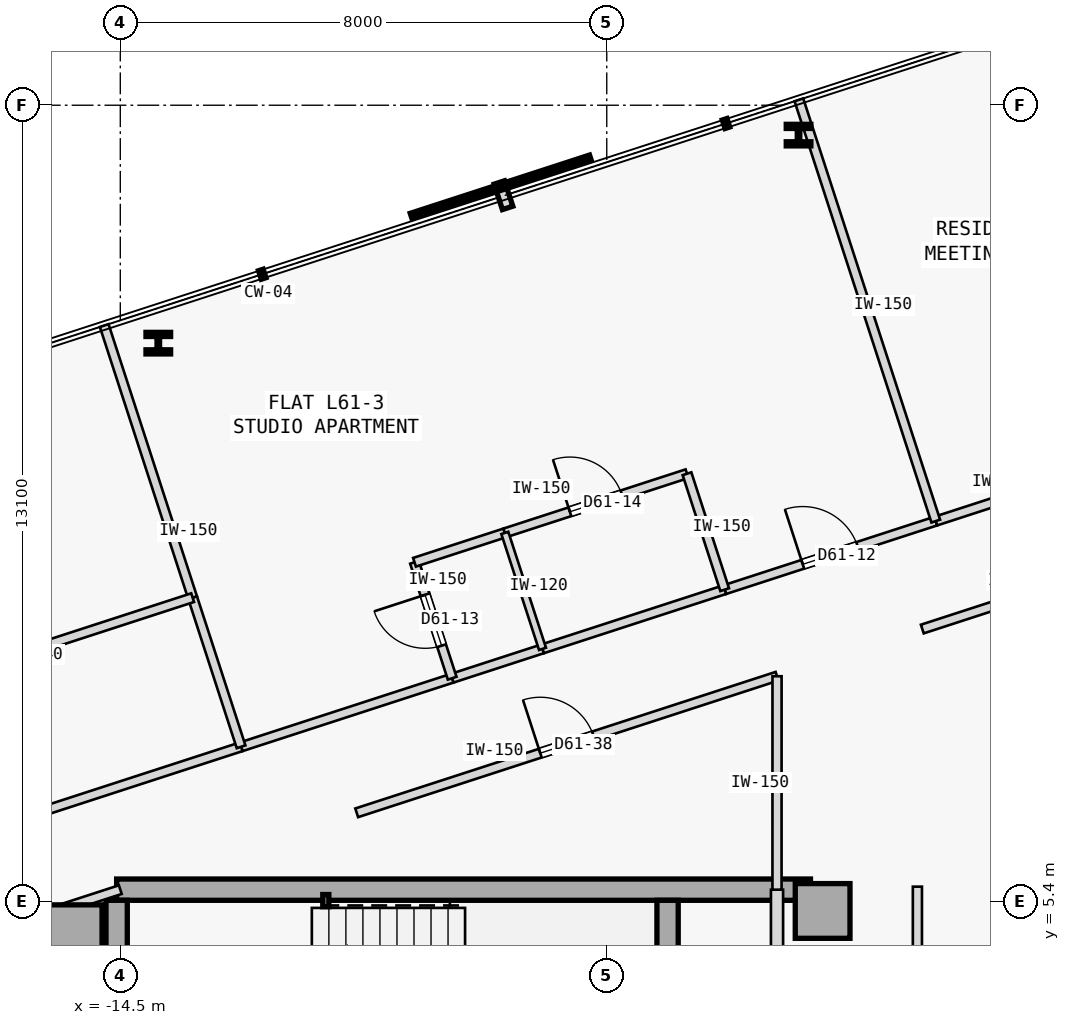
"""IFC4 building model, lengths in metres.
Left out: names, types, materials, properties, quantities, classifications, styles, units other than length and angle.
Written with IfcOpenShell. Run it as: python <this file> out.ifc"""

import sys

from ifc_helpers import new_model, si_unit, direction, frame, frame_2d, origin, origin_2d, place, context, subcontext, project, spatial, rectangle, hollow_rectangle, i_section, extrude, element, fill, save


model = new_model("IFC4")
c1 = context("Model", 3, precision=1e-05, world=origin(), true_north=direction((0.0, 1.0)))
c2 = subcontext(c1, "Body", "Model", "MODEL_VIEW")
j1 = project(units=[si_unit("LENGTHUNIT", "METRE"), si_unit("PLANEANGLEUNIT", "RADIAN")], contexts=[c1])
p1 = place(None, origin())
s1 = spatial("IfcSite", under=j1, at=p1, CompositionType="ELEMENT")
p2 = place(p1, origin())
s2 = spatial("IfcBuilding", under=s1, at=p2, CompositionType="ELEMENT")
p3 = place(p2, frame((0.0, 0.0, 231.0)))
s3 = spatial("IfcBuildingStorey", under=s2, at=p3, CompositionType="ELEMENT", Elevation=231.0)
for number, where, z_axis, x_axis in (
    (1, (-15.25, 4.9, 0.0), (0.0, 0.0, 1.0), (1.0, 0.0, 0.0)),
    (2, (-2.95, 5.25, 0.0), (0.0, 0.0, 1.0), (1.0, 0.0, 0.0)),
):
    element("IfcColumn", number, at=place(p3, frame(where, z_axis=z_axis, x_axis=x_axis)), inside=s3, PredefinedType="COLUMN", context=c2, shape_type="SweptSolid", body=[
        extrude(rectangle(XDim=0.9, YDim=0.9, at=origin_2d()), origin(), (0.0, 0.0, 1.0), 3.35),
    ])
p4 = place(p3, frame((-14.56, 5.6, 0.0), z_axis=(0.0, 0.0, 1.0), x_axis=(1.0, 0.0, 0.0)))
e3 = element("IfcWall", 3, at=p4, inside=s3, PredefinedType="SHEAR", context=c2, shape_type="SweptSolid", body=[
    extrude(rectangle(XDim=11.41, YDim=0.35, at=frame_2d((5.705, 0.0))), origin(), (0.0, 0.0, 1.0), 3.125),
])
p5 = place(p3, frame((-14.56, -5.425, 0.0), z_axis=(0.0, 0.0, 1.0), x_axis=(0.0, 1.0, 0.0)))
e4 = element("IfcWall", 4, at=p5, inside=s3, PredefinedType="SHEAR", context=c2, shape_type="SweptSolid", body=[
    extrude(rectangle(XDim=10.85, YDim=0.35, at=frame_2d((5.425, 0.0))), origin(), (0.0, 0.0, 1.0), 3.125),
])
p6 = place(p3, frame((-5.5, 2.15, 0.0), z_axis=(0.0, 0.0, 1.0), x_axis=(0.0, 1.0, 0.0)))
e5 = element("IfcWall", 5, at=p6, inside=s3, PredefinedType="SHEAR", context=c2, shape_type="SweptSolid", body=[
    extrude(rectangle(XDim=3.275, YDim=0.35, at=frame_2d((1.638, 0.0))), origin(), (0.0, 0.0, 1.0), 3.125),
])
p7 = place(p3, frame((-11.12, 5.42, 0.0), z_axis=(0.0, 0.0, 1.0), x_axis=(1.0, 0.0, 0.0)))
e6 = element("IfcColumn", 6, at=p7, inside=s3, PredefinedType="COLUMN", context=c2, shape_type="SweptSolid", body=[
    extrude(hollow_rectangle(XDim=0.1, YDim=0.2, WallThickness=0.008, at=origin_2d()), origin(), (0.0, 0.0, 1.0), 3.35),
])
for number, where, z_axis, x_axis in (
    (7, (-3.346, 18.009, 0.0), (0.0, 0.0, 1.0), (1.0, 0.0, 0.0)),
    (8, (-13.875, 14.587, 0.0), (0.0, 0.0, 1.0), (1.0, 0.0, 0.0)),
):
    element("IfcColumn", number, at=place(p3, frame(where, z_axis=z_axis, x_axis=x_axis)), inside=s3, PredefinedType="COLUMN", context=c2, shape_type="SweptSolid", body=[
        extrude(i_section(OverallWidth=0.405, OverallDepth=0.355, WebThickness=0.042, FlangeThickness=0.068, FilletRadius=0.015, at=origin_2d()), origin(), (0.0, 0.0, 1.0), 3.35),
    ])
p8 = place(p3, frame((-3.7, -1.15, 0.0), z_axis=(0.0, 0.0, 1.0), x_axis=(0.0, 1.0, 0.0)))
e9 = element("IfcWall", 9, at=p8, inside=s3, PredefinedType="STANDARD", context=c2, shape_type="SweptSolid", body=[
    extrude(rectangle(XDim=6.75, YDim=0.2, at=frame_2d((3.375, 0.0))), origin(), (0.0, 0.0, 1.0), 3.125),
])
p9 = place(p8, frame((3.6, 0.0, 0.0)))
e10 = element("IfcOpeningElement", 10, at=p9, cuts=e9, PredefinedType="OPENING", context=c2, shape_type="SweptSolid", body=[
    extrude(rectangle(XDim=0.92, YDim=2.15, at=frame_2d((0.46, 1.075))), frame((0.0, 0.11, 0.0), z_axis=(0.0, -1.0, 0.0), x_axis=(1.0, 0.0, 0.0)), (0.0, 0.0, 1.0), 0.22),
])
p10 = place(p8, frame((0.85, 0.0, 0.0)))
e11 = element("IfcOpeningElement", 11, at=p10, cuts=e9, PredefinedType="OPENING", context=c2, shape_type="SweptSolid", body=[
    extrude(rectangle(XDim=0.9, YDim=2.15, at=frame_2d((0.45, 1.075))), frame((0.0, 0.11, 0.0), z_axis=(0.0, -1.0, 0.0), x_axis=(1.0, 0.0, 0.0)), (0.0, 0.0, 1.0), 0.22),
])
p11 = place(p3, frame((-1.391, -5.65, 0.0), z_axis=(0.0, 0.0, 1.0), x_axis=(-8.6422954e-05, 0.999999996266, 0.0)))
e12 = element("IfcWall", 12, at=p11, inside=s3, PredefinedType="PARTITIONING", context=c2, shape_type="SweptSolid", body=[
    extrude(rectangle(XDim=11.3, YDim=0.15, at=frame_2d((5.65, 0.0))), origin(), (0.0, 0.0, 1.0), 3.125),
])
p12 = place(p11, frame((5.175, 0.0, 0.0)))
e13 = element("IfcOpeningElement", 13, at=p12, cuts=e12, PredefinedType="OPENING", context=c2, shape_type="SweptSolid", body=[
    extrude(rectangle(XDim=0.95, YDim=2.15, at=frame_2d((0.475, 1.075))), frame((0.0, 0.085, 0.0), z_axis=(0.0, -1.0, 0.0), x_axis=(1.0, 0.0, 0.0)), (0.0, 0.0, 1.0), 0.17),
])
p13 = place(p3, frame((-12.513, 7.949, 0.0), z_axis=(0.0, 0.0, 1.0), x_axis=(0.951050780541, 0.309034646652, 0.0)))
e14 = element("IfcWall", 14, at=p13, inside=s3, PredefinedType="PARTITIONING", context=c2, shape_type="SweptSolid", body=[
    extrude(rectangle(XDim=3.65, YDim=0.15, at=frame_2d((1.825, 0.0))), origin(), (0.0, 0.0, 1.0), 3.125),
])
p14 = place(p3, frame((-4.561, 10.533, 0.0), z_axis=(0.0, 0.0, 1.0), x_axis=(0.951057168147, 0.309014988174, 0.0)))
e15 = element("IfcWall", 15, at=p14, inside=s3, PredefinedType="PARTITIONING", context=c2, shape_type="SweptSolid", body=[
    extrude(rectangle(XDim=3.65, YDim=0.15, at=frame_2d((1.825, 0.0))), origin(), (0.0, 0.0, 1.0), 3.125),
])
p15 = place(p14, frame((1.35, 0.0, 0.0)))
e16 = element("IfcOpeningElement", 16, at=p15, cuts=e15, PredefinedType="OPENING", context=c2, shape_type="SweptSolid", body=[
    extrude(rectangle(XDim=0.95, YDim=2.15, at=frame_2d((0.475, 1.075))), frame((0.0, 0.085, 0.0), z_axis=(0.0, -1.0, 0.0), x_axis=(1.0, 0.0, 0.0)), (0.0, 0.0, 1.0), 0.17),
])
p16 = place(p3, frame((-9.042, 9.077, 0.0), z_axis=(0.0, 0.0, 1.0), x_axis=(0.951062779317, 0.308997718112, 0.0)))
e17 = element("IfcWall", 17, at=p16, inside=s3, PredefinedType="PARTITIONING", context=c2, shape_type="SweptSolid", body=[
    extrude(rectangle(XDim=1.562, YDim=0.15, at=frame_2d((0.781, 0.0))), origin(), (0.0, 0.0, 1.0), 3.125),
])
p17 = place(p3, frame((-7.557, 9.56, 0.0), z_axis=(0.0, 0.0, 1.0), x_axis=(0.951058557014, 0.309010713619, 0.0)))
e18 = element("IfcWall", 18, at=p17, inside=s3, PredefinedType="PARTITIONING", context=c2, shape_type="SweptSolid", body=[
    extrude(rectangle(XDim=3.15, YDim=0.15, at=frame_2d((1.575, 0.0))), origin(), (0.0, 0.0, 1.0), 3.125),
])
p18 = place(p3, frame((-17.792, 4.531, 0.0), z_axis=(0.0, 0.0, 1.0), x_axis=(0.951047546178, 0.309044600193, 0.0)))
e19 = element("IfcWall", 19, at=p18, inside=s3, PredefinedType="PARTITIONING", context=c2, shape_type="SweptSolid", body=[
    extrude(rectangle(XDim=3.461, YDim=0.15, at=frame_2d((1.73, 0.0))), origin(), (0.0, 0.0, 1.0), 3.125),
])
p19 = place(p18, frame((0.302, 0.0, 0.0)))
e20 = element("IfcOpeningElement", 20, at=p19, cuts=e19, PredefinedType="OPENING", context=c2, shape_type="SweptSolid", body=[
    extrude(rectangle(XDim=0.92, YDim=2.15, at=frame_2d((0.46, 1.075))), frame((0.0, 0.085, 0.0), z_axis=(0.0, -1.0, 0.0), x_axis=(1.0, 0.0, 0.0)), (0.0, 0.0, 1.0), 0.17),
])
p20 = place(p3, frame((-1.311, 9.886, 0.0), z_axis=(0.0, 0.0, 1.0), x_axis=(0.951068803905, 0.308979174442, 0.0)))
e21 = element("IfcWall", 21, at=p20, inside=s3, PredefinedType="PARTITIONING", context=c2, shape_type="SweptSolid", body=[
    extrude(rectangle(XDim=3.46, YDim=0.15, at=frame_2d((1.73, 0.0))), origin(), (0.0, 0.0, 1.0), 3.125),
])
p21 = place(p3, frame((-10.612, 6.864, 0.0), z_axis=(0.0, 0.0, 1.0), x_axis=(0.951060972078, 0.309003280548, 0.0)))
e22 = element("IfcWall", 22, at=p21, inside=s3, PredefinedType="PARTITIONING", context=c2, shape_type="SweptSolid", body=[
    extrude(rectangle(XDim=7.268, YDim=0.15, at=frame_2d((3.634, 0.0))), origin(), (0.0, 0.0, 1.0), 3.125),
])
p22 = place(p21, frame((3.174, 0.0, 0.0)))
e23 = element("IfcOpeningElement", 23, at=p22, cuts=e22, PredefinedType="OPENING", context=c2, shape_type="SweptSolid", body=[
    extrude(rectangle(XDim=0.92, YDim=2.15, at=frame_2d((0.46, 1.075))), frame((0.0, 0.085, 0.0), z_axis=(0.0, -1.0, 0.0), x_axis=(1.0, 0.0, 0.0)), (0.0, 0.0, 1.0), 0.17),
])
p23 = place(p3, frame((-3.7, 5.6, 0.0), z_axis=(0.0, 0.0, 1.0), x_axis=(0.000139120755, 0.999999990323, 0.0)))
e24 = element("IfcWall", 24, at=p23, inside=s3, PredefinedType="PARTITIONING", context=c2, shape_type="SweptSolid", body=[
    extrude(rectangle(XDim=3.51, YDim=0.15, at=frame_2d((1.755, 0.0))), origin(), (0.0, 0.0, 1.0), 3.125),
])
p24 = place(p3, frame((-18.292, 6.072, 0.0), z_axis=(0.0, 0.0, 1.0), x_axis=(0.951062707515, 0.30899793911, 0.0)))
e25 = element("IfcWall", 25, at=p24, inside=s3, PredefinedType="PARTITIONING", context=c2, shape_type="SweptSolid", body=[
    extrude(rectangle(XDim=6.076, YDim=0.15, at=frame_2d((3.038, 0.0))), origin(), (0.0, 0.0, 1.0), 3.125),
])
p25 = place(p24, frame((0.877, 0.0, 0.0)))
e26 = element("IfcOpeningElement", 26, at=p25, cuts=e25, PredefinedType="OPENING", context=c2, shape_type="SweptSolid", body=[
    extrude(rectangle(XDim=0.92, YDim=2.15, at=frame_2d((0.46, 1.075))), frame((0.0, 0.085, 0.0), z_axis=(0.0, -1.0, 0.0), x_axis=(1.0, 0.0, 0.0)), (0.0, 0.0, 1.0), 0.17),
])
p26 = place(p3, frame((-1.089, 11.661, 0.0), z_axis=(0.0, 0.0, 1.0), x_axis=(0.951043687064, 0.309056475901, 0.0)))
e27 = element("IfcWall", 27, at=p26, inside=s3, PredefinedType="PARTITIONING", context=c2, shape_type="SweptSolid", body=[
    extrude(rectangle(XDim=4.663, YDim=0.15, at=frame_2d((2.332, 0.0))), origin(), (0.0, 0.0, 1.0), 3.125),
])
p27 = place(p26, frame((1.872, 0.0, 0.0)))
e28 = element("IfcOpeningElement", 28, at=p27, cuts=e27, PredefinedType="OPENING", context=c2, shape_type="SweptSolid", body=[
    extrude(rectangle(XDim=0.92, YDim=2.15, at=frame_2d((0.46, 1.075))), frame((0.0, 0.085, 0.0), z_axis=(0.0, -1.0, 0.0), x_axis=(1.0, 0.0, 0.0)), (0.0, 0.0, 1.0), 0.17),
])
p28 = place(p3, frame((-9.042, 9.077, 0.0), z_axis=(0.0, 0.0, 1.0), x_axis=(-0.308912611775, 0.951090425925, 0.0)))
e29 = element("IfcWall", 29, at=p28, inside=s3, PredefinedType="PARTITIONING", context=c2, shape_type="SweptSolid", body=[
    extrude(rectangle(XDim=2.005, YDim=0.15, at=frame_2d((1.002, 0.0))), origin(), (0.0, 0.0, 1.0), 3.125),
])
p29 = place(p28, frame((0.562, 0.0, 0.0)))
e30 = element("IfcOpeningElement", 30, at=p29, cuts=e29, PredefinedType="OPENING", context=c2, shape_type="SweptSolid", body=[
    extrude(rectangle(XDim=0.88, YDim=2.15, at=frame_2d((0.44, 1.075))), frame((0.0, 0.085, 0.0), z_axis=(0.0, -1.0, 0.0), x_axis=(1.0, 0.0, 0.0)), (0.0, 0.0, 1.0), 0.17),
])
p30 = place(p3, frame((-9.662, 10.984, 0.0), z_axis=(0.0, 0.0, 1.0), x_axis=(0.951047852885, 0.309043656337, 0.0)))
e31 = element("IfcWall", 31, at=p30, inside=s3, PredefinedType="PARTITIONING", context=c2, shape_type="SweptSolid", body=[
    extrude(rectangle(XDim=1.562, YDim=0.15, at=frame_2d((0.781, 0.0))), origin(), (0.0, 0.0, 1.0), 3.125),
])
p31 = place(p3, frame((-8.176, 11.467, 0.0), z_axis=(0.0, 0.0, 1.0), x_axis=(0.951058557014, 0.309010713619, 0.0)))
e32 = element("IfcWall", 32, at=p31, inside=s3, PredefinedType="PARTITIONING", context=c2, shape_type="SweptSolid", body=[
    extrude(rectangle(XDim=3.15, YDim=0.15, at=frame_2d((1.575, 0.0))), origin(), (0.0, 0.0, 1.0), 3.125),
])
p32 = place(p31, frame((1.125, 0.0, 0.0)))
e33 = element("IfcOpeningElement", 33, at=p32, cuts=e32, PredefinedType="OPENING", context=c2, shape_type="SweptSolid", body=[
    extrude(rectangle(XDim=0.9, YDim=2.15, at=frame_2d((0.45, 1.075))), frame((0.0, 0.085, 0.0), z_axis=(0.0, -1.0, 0.0), x_axis=(1.0, 0.0, 0.0)), (0.0, 0.0, 1.0), 0.17),
])
p33 = place(p3, frame((-4.561, 10.533, 0.0), z_axis=(0.0, 0.0, 1.0), x_axis=(-0.309022749039, 0.951054646472, 0.0)))
e34 = element("IfcWall", 34, at=p33, inside=s3, PredefinedType="PARTITIONING", context=c2, shape_type="SweptSolid", body=[
    extrude(rectangle(XDim=2.005, YDim=0.15, at=frame_2d((1.002, 0.0))), origin(), (0.0, 0.0, 1.0), 3.125),
])
p34 = place(p3, frame((-12.513, 7.949, 0.0), z_axis=(0.0, 0.0, 1.0), x_axis=(-0.309062527822, 0.951041720376, 0.0)))
e35 = element("IfcWall", 35, at=p34, inside=s3, PredefinedType="PARTITIONING", context=c2, shape_type="SweptSolid", body=[
    extrude(rectangle(XDim=2.579, YDim=0.15, at=frame_2d((1.29, 0.0))), origin(), (0.0, 0.0, 1.0), 3.125),
])
p35 = place(p3, frame((-13.311, 10.402, 0.0), z_axis=(0.0, 0.0, 1.0), x_axis=(-0.309010977541, 0.951058471262, 0.0)))
e36 = element("IfcWall", 36, at=p35, inside=s3, PredefinedType="PARTITIONING", context=c2, shape_type="SweptSolid", body=[
    extrude(rectangle(XDim=4.705, YDim=0.15, at=frame_2d((2.353, 0.0))), origin(), (0.0, 0.0, 1.0), 3.125),
])
p36 = place(p3, frame((-1.089, 11.661, 0.0), z_axis=(0.0, 0.0, 1.0), x_axis=(-0.309029230739, 0.951052540372, 0.0)))
e37 = element("IfcWall", 37, at=p36, inside=s3, PredefinedType="PARTITIONING", context=c2, shape_type="SweptSolid", body=[
    extrude(rectangle(XDim=7.284, YDim=0.15, at=frame_2d((3.642, 0.0))), origin(), (0.0, 0.0, 1.0), 3.125),
])
p37 = place(p3, frame((-7.557, 9.56, 0.0), z_axis=(0.0, 0.0, 1.0), x_axis=(-0.309022749039, 0.951054646472, 0.0)))
e38 = element("IfcWall", 38, at=p37, inside=s3, PredefinedType="PARTITIONING", context=c2, shape_type="SweptSolid", body=[
    extrude(rectangle(XDim=2.005, YDim=0.12, at=frame_2d((1.002, 0.0))), origin(), (0.0, 0.0, 1.0), 3.125),
])
p38 = place(p3, frame((-19.089, 8.524, 0.0), z_axis=(0.0, 0.0, 1.0), x_axis=(0.951050898488, 0.309034283674, 0.0)))
e39 = element("IfcWall", 39, at=p38, inside=s3, PredefinedType="PARTITIONING", context=c2, shape_type="SweptSolid", body=[
    extrude(rectangle(XDim=6.076, YDim=0.15, at=frame_2d((3.038, 0.0))), origin(), (0.0, 0.0, 1.0), 3.125),
])
p39 = place(p38, frame((2.578, 0.0, 0.0)))
e40 = element("IfcOpeningElement", 40, at=p39, cuts=e39, PredefinedType="OPENING", context=c2, shape_type="SweptSolid", body=[
    extrude(rectangle(XDim=0.92, YDim=2.15, at=frame_2d((0.46, 1.075))), frame((0.0, 0.085, 0.0), z_axis=(0.0, -1.0, 0.0), x_axis=(1.0, 0.0, 0.0)), (0.0, 0.0, 1.0), 0.17),
])
p40 = place(p15, origin())
e41 = element("IfcDoor", 41, at=p40, inside=s3, OperationType="SINGLE_SWING_LEFT", PredefinedType="DOOR", context=c2, shape_type="SweptSolid", body=[
    extrude(rectangle(XDim=0.95, YDim=2.15, at=frame_2d((0.475, 1.075))), frame((0.0, 0.025, 0.0), z_axis=(0.0, -1.0, 0.0), x_axis=(1.0, 0.0, 0.0)), (0.0, 0.0, 1.0), 0.05),
])
fill(e16, e41)
p41 = place(p29, origin())
e42 = element("IfcDoor", 42, at=p41, inside=s3, OperationType="SINGLE_SWING_RIGHT", PredefinedType="DOOR", context=c2, shape_type="SweptSolid", body=[
    extrude(rectangle(XDim=0.88, YDim=2.15, at=frame_2d((0.44, 1.075))), frame((0.0, 0.025, 0.0), z_axis=(0.0, -1.0, 0.0), x_axis=(1.0, 0.0, 0.0)), (0.0, 0.0, 1.0), 0.05),
])
fill(e30, e42)
p42 = place(p32, origin())
e43 = element("IfcDoor", 43, at=p42, inside=s3, OperationType="SINGLE_SWING_LEFT", PredefinedType="DOOR", context=c2, shape_type="SweptSolid", body=[
    extrude(rectangle(XDim=0.9, YDim=2.15, at=frame_2d((0.45, 1.075))), frame((0.0, 0.025, 0.0), z_axis=(0.0, -1.0, 0.0), x_axis=(1.0, 0.0, 0.0)), (0.0, 0.0, 1.0), 0.05),
])
fill(e33, e43)
p43 = place(p22, origin())
e44 = element("IfcDoor", 44, at=p43, inside=s3, OperationType="SINGLE_SWING_LEFT", PredefinedType="DOOR", context=c2, shape_type="SweptSolid", body=[
    extrude(rectangle(XDim=0.92, YDim=2.15, at=frame_2d((0.46, 1.075))), frame((0.0, 0.025, 0.0), z_axis=(0.0, -1.0, 0.0), x_axis=(1.0, 0.0, 0.0)), (0.0, 0.0, 1.0), 0.05),
])
fill(e23, e44)
save(model, sys.argv[1])
